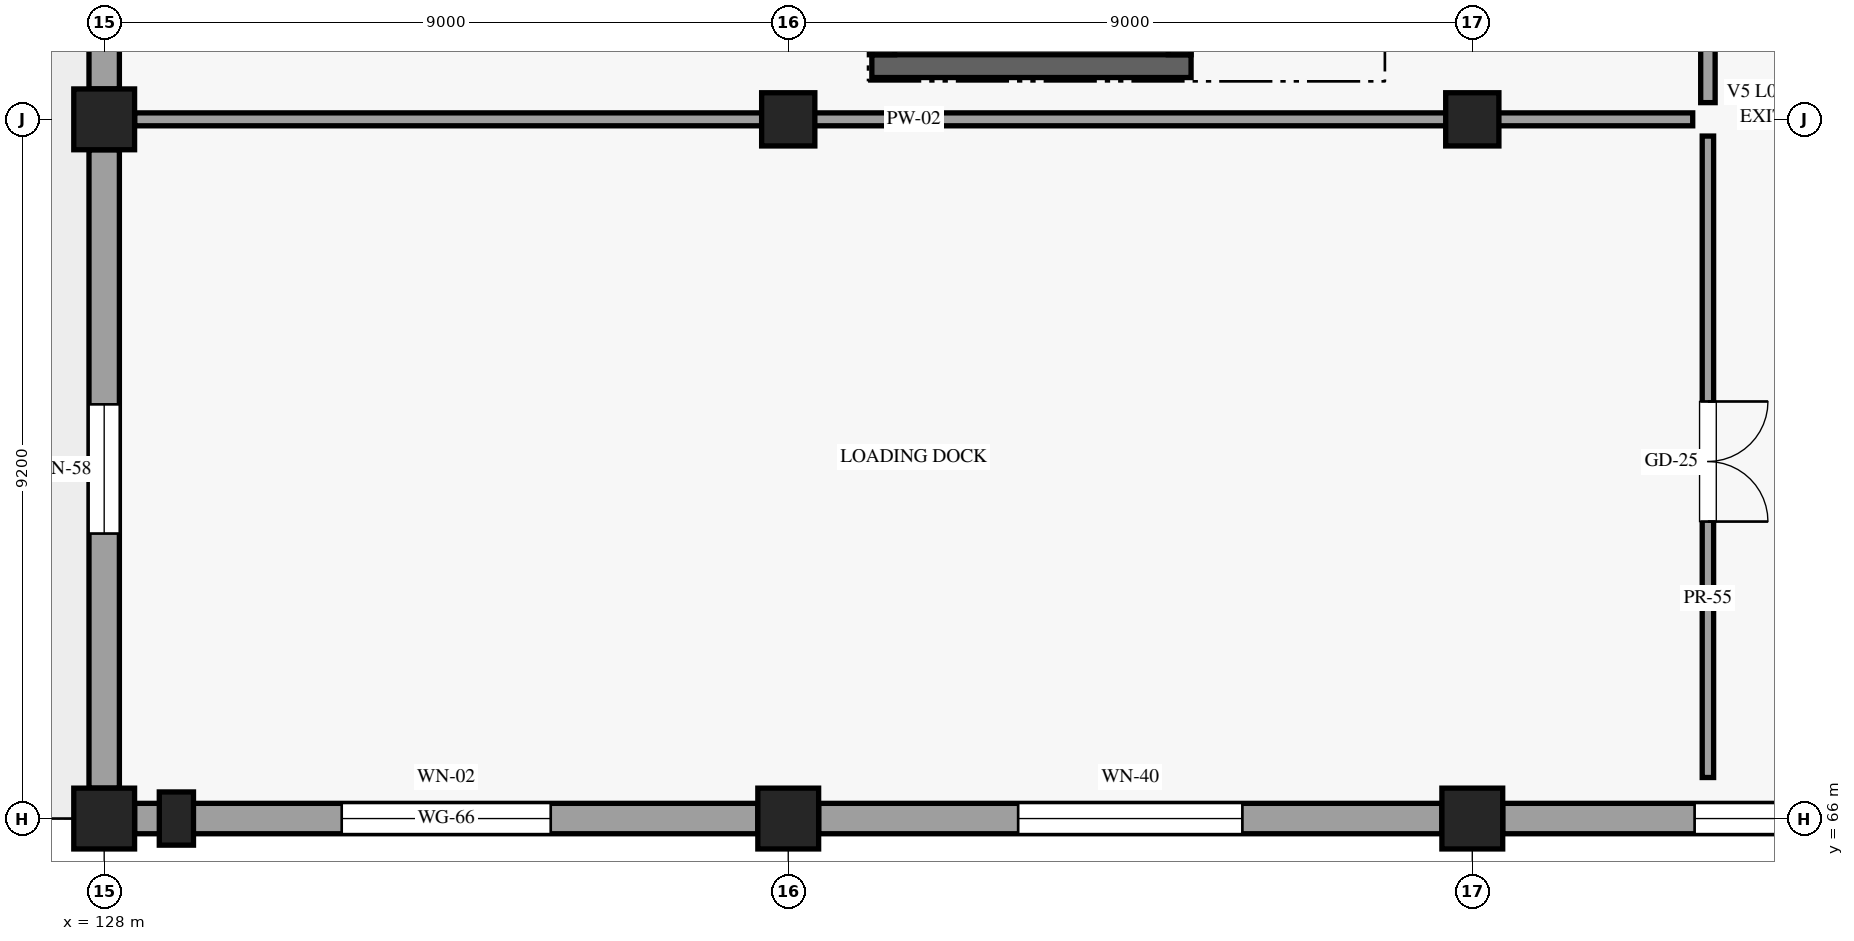
"""IFC4 building model, lengths in metres.
Left out: names, types, materials, properties, quantities, classifications, styles, units other than length and angle.
Written with IfcOpenShell. Run it as: python <this file> out.ifc"""

import sys

from ifc_helpers import new_model, si_unit, direction, frame, frame_2d, origin, origin_2d, place, context, subcontext, project, spatial, rectangle, extrude, element, fill, save


model = new_model("IFC4")
c1 = context("Model", 3, precision=1e-05, world=origin(), true_north=direction((0.0, 1.0)))
c2 = subcontext(c1, "Body", "Model", "MODEL_VIEW")
j1 = project(units=[si_unit("LENGTHUNIT", "METRE"), si_unit("PLANEANGLEUNIT", "RADIAN")], contexts=[c1])
p1 = place(None, origin())
s1 = spatial("IfcSite", under=j1, at=p1, CompositionType="ELEMENT")
p2 = place(p1, origin())
s2 = spatial("IfcBuilding", under=s1, at=p2, CompositionType="ELEMENT")
p3 = place(p2, origin())
s3 = spatial("IfcBuildingStorey", under=s2, at=p3, CompositionType="ELEMENT", Elevation=0.0)
for number, where, z_axis, x_axis in (
    (1, (128.0, 66.0, 0.0), (0.0, 0.0, 1.0), (1.0, 0.0, 0.0)),
    (2, (128.0, 75.2, 0.0), (0.0, 0.0, 1.0), (1.0, 0.0, 0.0)),
    (3, (137.0, 66.0, 0.0), (0.0, 0.0, 1.0), (1.0, 0.0, 0.0)),
):
    element("IfcColumn", number, at=place(p3, frame(where, z_axis=z_axis, x_axis=x_axis)), inside=s3, PredefinedType="COLUMN", context=c2, shape_type="SweptSolid", body=[
        extrude(rectangle(XDim=0.8, YDim=0.8, at=origin_2d()), origin(), (0.0, 0.0, 1.0), 5.4),
    ])
p4 = place(p3, frame((137.0, 75.2, 0.0), z_axis=(0.0, 0.0, 1.0), x_axis=(1.0, 0.0, 0.0)))
e4 = element("IfcColumn", 4, at=p4, inside=s3, PredefinedType="COLUMN", context=c2, shape_type="SweptSolid", body=[
    extrude(rectangle(XDim=0.7, YDim=0.7, at=origin_2d()), origin(), (0.0, 0.0, 1.0), 5.4),
])
p5 = place(p3, frame((146.0, 66.0, 0.0), z_axis=(0.0, 0.0, 1.0), x_axis=(1.0, 0.0, 0.0)))
e5 = element("IfcColumn", 5, at=p5, inside=s3, PredefinedType="COLUMN", context=c2, shape_type="SweptSolid", body=[
    extrude(rectangle(XDim=0.8, YDim=0.8, at=origin_2d()), origin(), (0.0, 0.0, 1.0), 5.4),
])
p6 = place(p3, frame((146.0, 75.2, 0.0), z_axis=(0.0, 0.0, 1.0), x_axis=(1.0, 0.0, 0.0)))
e6 = element("IfcColumn", 6, at=p6, inside=s3, PredefinedType="COLUMN", context=c2, shape_type="SweptSolid", body=[
    extrude(rectangle(XDim=0.7, YDim=0.7, at=origin_2d()), origin(), (0.0, 0.0, 1.0), 5.4),
])
p7 = place(p3, frame((128.95, 66.0, 0.0), z_axis=(0.0, 0.0, 1.0), x_axis=(1.0, 0.0, 0.0)))
e7 = element("IfcColumn", 7, at=p7, inside=s3, PredefinedType="PILASTER", context=c2, shape_type="SweptSolid", body=[
    extrude(rectangle(XDim=0.45, YDim=0.7, at=origin_2d()), origin(), (0.0, 0.0, 1.0), 4.35),
])
p8 = place(p3, frame((128.4, 66.0, 0.0), z_axis=(0.0, 0.0, 1.0), x_axis=(1.0, 0.0, 0.0)))
e8 = element("IfcWall", 8, at=p8, inside=s3, PredefinedType="STANDARD", context=c2, shape_type="SweptSolid", body=[
    extrude(rectangle(XDim=8.2, YDim=0.4, at=frame_2d((4.1, 0.0))), origin(), (0.0, 0.0, 1.0), 4.095),
])
p9 = place(p8, frame((5.475, 0.0, 0.85), z_axis=(0.0, 0.0, 1.0), x_axis=(-1.0, 0.0, 0.0)))
e9 = element("IfcOpeningElement", 9, at=p9, cuts=e8, PredefinedType="OPENING", context=c2, shape_type="SweptSolid", body=[
    extrude(rectangle(XDim=2.75, YDim=2.45, at=frame_2d((1.375, 1.225))), frame((0.0, 0.21, 0.0), z_axis=(0.0, -1.0, 0.0), x_axis=(1.0, 0.0, 0.0)), (0.0, 0.0, 1.0), 0.42),
])
p10 = place(p3, frame((137.4, 66.0, 0.0), z_axis=(0.0, 0.0, 1.0), x_axis=(1.0, 0.0, 0.0)))
e10 = element("IfcWall", 10, at=p10, inside=s3, PredefinedType="STANDARD", context=c2, shape_type="SweptSolid", body=[
    extrude(rectangle(XDim=8.2, YDim=0.4, at=frame_2d((4.1, 0.0))), origin(), (0.0, 0.0, 1.0), 4.095),
])
p11 = place(p10, frame((5.575, 0.0, 0.85), z_axis=(0.0, 0.0, 1.0), x_axis=(-1.0, 0.0, 0.0)))
e11 = element("IfcOpeningElement", 11, at=p11, cuts=e10, PredefinedType="OPENING", context=c2, shape_type="SweptSolid", body=[
    extrude(rectangle(XDim=2.95, YDim=2.5, at=frame_2d((1.475, 1.25))), frame((0.0, 0.21, 0.0), z_axis=(0.0, -1.0, 0.0), x_axis=(1.0, 0.0, 0.0)), (0.0, 0.0, 1.0), 0.42),
])
p12 = place(p3, frame((146.4, 66.0, 0.0), z_axis=(0.0, 0.0, 1.0), x_axis=(1.0, 0.0, 0.0)))
e12 = element("IfcWall", 12, at=p12, inside=s3, PredefinedType="STANDARD", context=c2, shape_type="SweptSolid", body=[
    extrude(rectangle(XDim=8.2, YDim=0.4, at=frame_2d((4.1, 0.0))), origin(), (0.0, 0.0, 1.0), 4.095),
])
p13 = place(p12, frame((5.675, 0.0, 0.85), z_axis=(0.0, 0.0, 1.0), x_axis=(-1.0, 0.0, 0.0)))
e13 = element("IfcOpeningElement", 13, at=p13, cuts=e12, PredefinedType="OPENING", context=c2, shape_type="SweptSolid", body=[
    extrude(rectangle(XDim=3.15, YDim=2.55, at=frame_2d((1.575, 1.275))), frame((0.0, 0.21, 0.0), z_axis=(0.0, -1.0, 0.0), x_axis=(1.0, 0.0, 0.0)), (0.0, 0.0, 1.0), 0.42),
])
p14 = place(p3, frame((128.0, 66.4, 0.0), z_axis=(0.0, 0.0, 1.0), x_axis=(0.0, 1.0, 0.0)))
e14 = element("IfcWall", 14, at=p14, inside=s3, PredefinedType="STANDARD", context=c2, shape_type="SweptSolid", body=[
    extrude(rectangle(XDim=8.4, YDim=0.4, at=frame_2d((4.2, 0.0))), origin(), (0.0, 0.0, 1.0), 4.095),
])
p15 = place(p14, frame((3.35, 0.0, 0.85)))
e15 = element("IfcOpeningElement", 15, at=p15, cuts=e14, PredefinedType="OPENING", context=c2, shape_type="SweptSolid", body=[
    extrude(rectangle(XDim=1.7, YDim=2.3, at=frame_2d((0.85, 1.15))), frame((0.0, 0.21, 0.0), z_axis=(0.0, -1.0, 0.0), x_axis=(1.0, 0.0, 0.0)), (0.0, 0.0, 1.0), 0.42),
])
p16 = place(p3, frame((128.0, 75.6, 0.0), z_axis=(0.0, 0.0, 1.0), x_axis=(0.0, 1.0, 0.0)))
e16 = element("IfcWall", 16, at=p16, inside=s3, PredefinedType="STANDARD", context=c2, shape_type="SweptSolid", body=[
    extrude(rectangle(XDim=8.4, YDim=0.4, at=frame_2d((4.2, 0.0))), origin(), (0.0, 0.0, 1.0), 4.095),
])
p17 = place(p16, frame((2.4, 0.0, 0.0)))
e17 = element("IfcOpeningElement", 17, at=p17, cuts=e16, PredefinedType="OPENING", context=c2, shape_type="SweptSolid", body=[
    extrude(rectangle(XDim=3.6, YDim=3.91, at=frame_2d((1.8, 1.955))), frame((0.0, 0.21, 0.0), z_axis=(0.0, -1.0, 0.0), x_axis=(1.0, 0.0, 0.0)), (0.0, 0.0, 1.0), 0.42),
])
p18 = place(p3, frame((138.1, 75.9, 0.0), z_axis=(0.0, 0.0, 1.0), x_axis=(1.0, 0.0, 0.0)))
e18 = element("IfcWall", 18, at=p18, inside=s3, PredefinedType="SHEAR", context=c2, shape_type="SweptSolid", body=[
    extrude(rectangle(XDim=4.2, YDim=0.3, at=frame_2d((2.1, 0.0))), origin(), (0.0, 0.0, 1.0), 5.12),
])
for number, where, z_axis, x_axis in (
    (19, (138.25, 76.05, 0.0), (0.0, 0.0, 1.0), (0.0, 1.0, 0.0)),
    (20, (142.15, 76.05, 0.0), (0.0, 0.0, 1.0), (0.0, 1.0, 0.0)),
):
    element("IfcWall", number, at=place(p3, frame(where, z_axis=z_axis, x_axis=x_axis)), inside=s3, PredefinedType="SHEAR", context=c2, shape_type="SweptSolid", body=[
        extrude(rectangle(XDim=8.65, YDim=0.3, at=frame_2d((4.325, 0.0))), origin(), (0.0, 0.0, 1.0), 5.12),
    ])
p19 = place(p3, frame((149.1, 66.54, 0.0), z_axis=(0.0, 0.0, 1.0), x_axis=(0.0, 1.0, 0.0)))
e21 = element("IfcWall", 21, at=p19, inside=s3, PredefinedType="PARTITIONING", context=c2, shape_type="SweptSolid", body=[
    extrude(rectangle(XDim=8.44, YDim=0.15, at=frame_2d((4.22, 0.0))), origin(), (0.0, 0.0, 1.0), 4.095),
])
p20 = place(p19, frame((4.948, 0.0, 0.0), z_axis=(0.0, 0.0, 1.0), x_axis=(-1.0, 0.0, 0.0)))
e22 = element("IfcOpeningElement", 22, at=p20, cuts=e21, PredefinedType="OPENING", context=c2, shape_type="SweptSolid", body=[
    extrude(rectangle(XDim=1.58, YDim=2.38, at=frame_2d((0.79, 1.19))), frame((0.0, 0.085, 0.0), z_axis=(0.0, -1.0, 0.0), x_axis=(1.0, 0.0, 0.0)), (0.0, 0.0, 1.0), 0.17),
])
p21 = place(p3, frame((128.4, 75.2, 0.0), z_axis=(0.0, 0.0, 1.0), x_axis=(1.0, 0.0, 0.0)))
e23 = element("IfcWall", 23, at=p21, inside=s3, PredefinedType="PARTITIONING", context=c2, shape_type="SweptSolid", body=[
    extrude(rectangle(XDim=20.5, YDim=0.17, at=frame_2d((10.25, 0.0))), origin(), (0.0, 0.0, 1.0), 4.095),
])
p22 = place(p3, frame((149.1, 75.42, 0.0), z_axis=(0.0, 0.0, 1.0), x_axis=(0.0, 1.0, 0.0)))
e24 = element("IfcWall", 24, at=p22, inside=s3, PredefinedType="PARTITIONING", context=c2, shape_type="SweptSolid", body=[
    extrude(rectangle(XDim=8.76, YDim=0.19, at=frame_2d((4.38, 0.0))), origin(), (0.0, 0.0, 1.0), 4.095),
])
p23 = place(p22, frame((5.0, 0.0, 0.0), z_axis=(0.0, 0.0, 1.0), x_axis=(-1.0, 0.0, 0.0)))
e25 = element("IfcOpeningElement", 25, at=p23, cuts=e24, PredefinedType="OPENING", context=c2, shape_type="SweptSolid", body=[
    extrude(rectangle(XDim=1.12, YDim=2.26, at=frame_2d((0.56, 1.13))), frame((0.0, 0.105, 0.0), z_axis=(0.0, -1.0, 0.0), x_axis=(1.0, 0.0, 0.0)), (0.0, 0.0, 1.0), 0.21),
])
p24 = place(p9, origin())
e26 = element("IfcWindow", 26, at=p24, inside=s3, PartitioningType="SINGLE_PANEL", PredefinedType="WINDOW", context=c2, shape_type="SweptSolid", body=[
    extrude(rectangle(XDim=2.75, YDim=2.45, at=frame_2d((1.375, 1.225))), frame((0.0, 0.03, 0.0), z_axis=(0.0, -1.0, 0.0), x_axis=(1.0, 0.0, 0.0)), (0.0, 0.0, 1.0), 0.06),
])
fill(e9, e26)
p25 = place(p11, origin())
e27 = element("IfcWindow", 27, at=p25, inside=s3, PartitioningType="SINGLE_PANEL", PredefinedType="WINDOW", context=c2, shape_type="SweptSolid", body=[
    extrude(rectangle(XDim=2.95, YDim=2.5, at=frame_2d((1.475, 1.25))), frame((0.0, 0.03, 0.0), z_axis=(0.0, -1.0, 0.0), x_axis=(1.0, 0.0, 0.0)), (0.0, 0.0, 1.0), 0.06),
])
fill(e11, e27)
p26 = place(p13, origin())
e28 = element("IfcWindow", 28, at=p26, inside=s3, PartitioningType="SINGLE_PANEL", PredefinedType="WINDOW", context=c2, shape_type="SweptSolid", body=[
    extrude(rectangle(XDim=3.15, YDim=2.55, at=frame_2d((1.575, 1.275))), frame((0.0, 0.03, 0.0), z_axis=(0.0, -1.0, 0.0), x_axis=(1.0, 0.0, 0.0)), (0.0, 0.0, 1.0), 0.06),
])
fill(e13, e28)
p27 = place(p15, origin())
e29 = element("IfcWindow", 29, at=p27, inside=s3, PartitioningType="SINGLE_PANEL", PredefinedType="WINDOW", context=c2, shape_type="SweptSolid", body=[
    extrude(rectangle(XDim=1.7, YDim=2.3, at=frame_2d((0.85, 1.15))), frame((0.0, 0.03, 0.0), z_axis=(0.0, -1.0, 0.0), x_axis=(1.0, 0.0, 0.0)), (0.0, 0.0, 1.0), 0.06),
])
fill(e15, e29)
p28 = place(p20, origin())
e30 = element("IfcDoor", 30, at=p28, inside=s3, OperationType="DOUBLE_DOOR_SINGLE_SWING", PredefinedType="DOOR", context=c2, shape_type="SweptSolid", body=[
    extrude(rectangle(XDim=1.58, YDim=2.38, at=frame_2d((0.79, 1.19))), frame((0.0, 0.025, 0.0), z_axis=(0.0, -1.0, 0.0), x_axis=(1.0, 0.0, 0.0)), (0.0, 0.0, 1.0), 0.05),
])
fill(e22, e30)
save(model, sys.argv[1])
